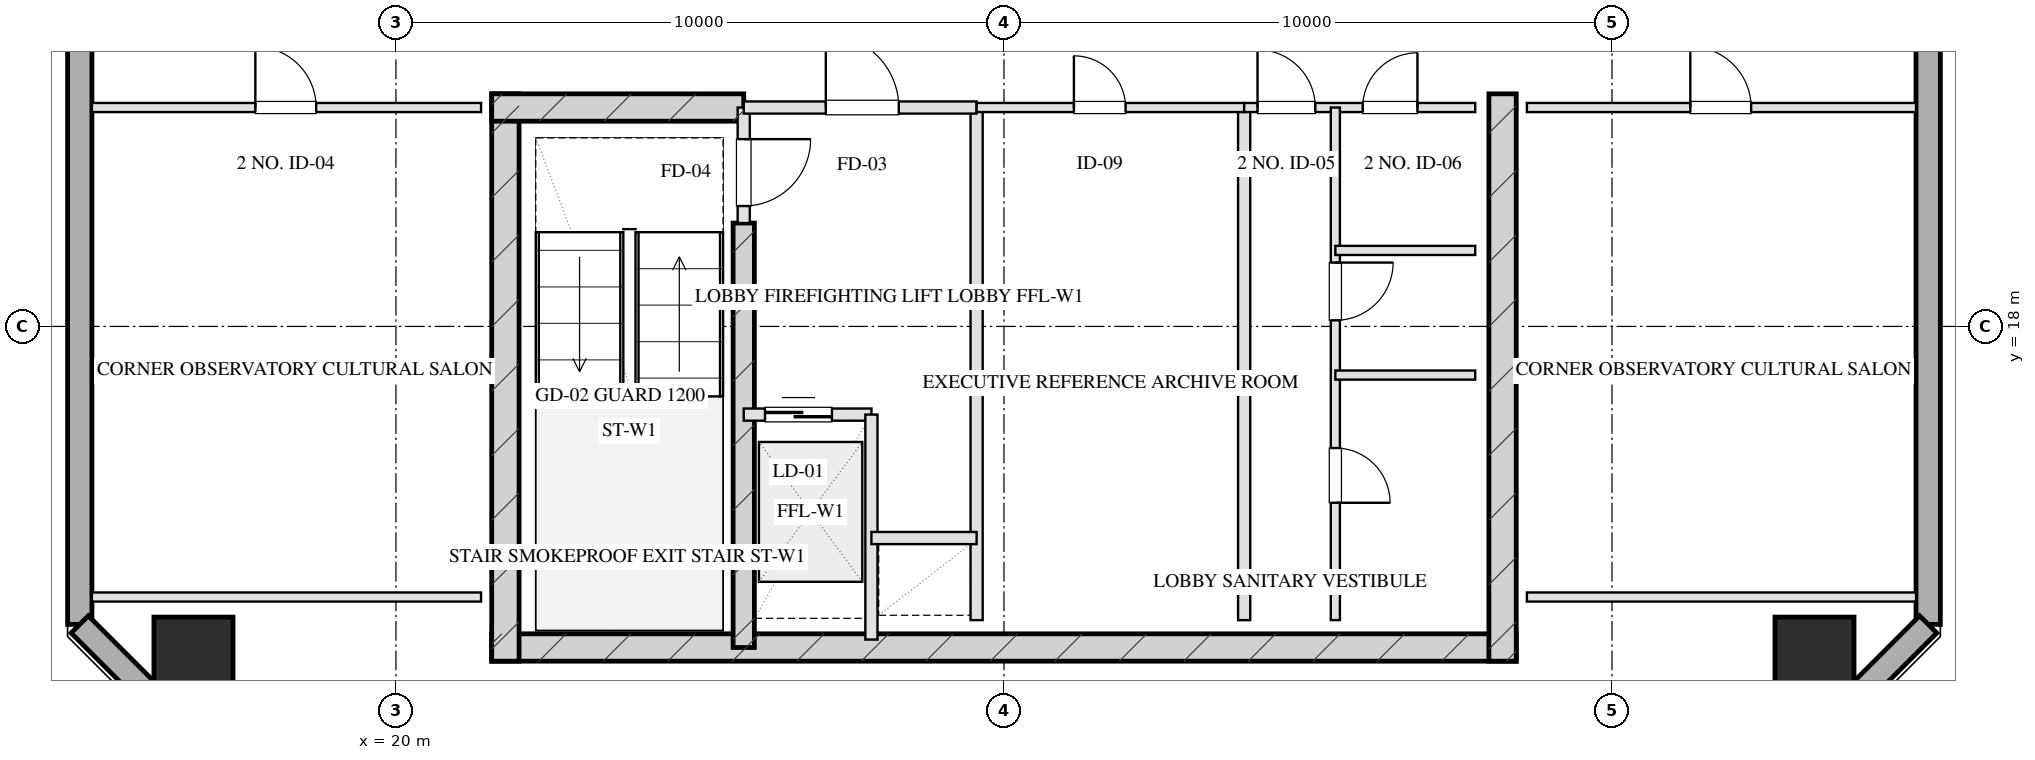
"""IFC4 building model, lengths in metres.
Left out: names, types, materials, properties, quantities, classifications, styles, units other than length and angle.
Written with IfcOpenShell. Run it as: python <this file> out.ifc"""

import sys

from ifc_helpers import new_model, si_unit, direction, frame, frame_2d, origin, origin_2d, place, context, subcontext, project, spatial, rectangle, hollow_rectangle, extrude, element, fill, save


model = new_model("IFC4")
c1 = context("Model", 3, precision=1e-05, world=origin(), true_north=direction((0.0, 1.0)))
c2 = subcontext(c1, "Body", "Model", "MODEL_VIEW")
j1 = project(units=[si_unit("LENGTHUNIT", "METRE"), si_unit("PLANEANGLEUNIT", "RADIAN")], contexts=[c1])
p1 = place(None, origin())
s1 = spatial("IfcSite", under=j1, at=p1, CompositionType="ELEMENT")
p2 = place(p1, origin())
s2 = spatial("IfcBuilding", under=s1, at=p2, CompositionType="ELEMENT")
p3 = place(p2, frame((0.0, 0.0, 266.4)))
s3 = spatial("IfcBuildingStorey", under=s2, at=p3, CompositionType="ELEMENT", Elevation=266.4)
p4 = place(p3, frame((21.575, 12.72, 0.0), z_axis=(0.0, 0.0, 1.0), x_axis=(1.0, 0.0, 0.0)))
e1 = element("IfcWall", 1, at=p4, inside=s3, PredefinedType="SHEAR", context=c2, shape_type="SweptSolid", body=[
    extrude(rectangle(XDim=16.85, YDim=0.45, at=frame_2d((8.425, 0.0))), origin(), (0.0, 0.0, 1.0), 3.2),
])
for number, where, z_axis, x_axis in (
    (2, (21.8, 21.825, 0.0), (0.0, 0.0, 1.0), (0.0, -1.0, 0.0)),
    (3, (38.2, 21.825, 0.0), (0.0, 0.0, 1.0), (0.0, -1.0, 0.0)),
):
    element("IfcWall", number, at=place(p3, frame(where, z_axis=z_axis, x_axis=x_axis)), inside=s3, PredefinedType="SHEAR", context=c2, shape_type="SweptSolid", body=[
        extrude(rectangle(XDim=9.33, YDim=0.45, at=frame_2d((4.665, 0.0))), origin(), (0.0, 0.0, 1.0), 3.2),
    ])
p5 = place(p3, frame((25.72, 19.7, 0.0), z_axis=(0.0, 0.0, 1.0), x_axis=(0.0, -1.0, 0.0)))
e4 = element("IfcWall", 4, at=p5, inside=s3, PredefinedType="SHEAR", context=c2, shape_type="SweptSolid", body=[
    extrude(rectangle(XDim=6.98, YDim=0.35, at=frame_2d((3.49, 0.0))), origin(), (0.0, 0.0, 1.0), 3.2),
])
p6 = place(p3, frame((21.575, 21.6, 0.0), z_axis=(0.0, 0.0, 1.0), x_axis=(1.0, 0.0, 0.0)))
e5 = element("IfcWall", 5, at=p6, inside=s3, PredefinedType="SHEAR", context=c2, shape_type="SweptSolid", body=[
    extrude(rectangle(XDim=4.145, YDim=0.45, at=frame_2d((2.073, 0.0))), origin(), (0.0, 0.0, 1.0), 3.2),
])
for number, where, z_axis, x_axis in (
    (6, (16.67, 12.57, 0.0), (0.0, 0.0, 1.0), (1.0, 0.0, 0.0)),
    (7, (43.33, 12.57, 0.0), (0.0, 0.0, 1.0), (1.0, 0.0, 0.0)),
):
    element("IfcColumn", number, at=place(p3, frame(where, z_axis=z_axis, x_axis=x_axis)), inside=s3, PredefinedType="COLUMN", context=c2, shape_type="SweptSolid", body=[
        extrude(hollow_rectangle(XDim=1.3, YDim=1.3, WallThickness=0.045, at=origin_2d()), origin(), (0.0, 0.0, 1.0), 3.201),
    ])
p7 = place(p3, frame((14.8, 13.1, 0.0), z_axis=(0.0, 0.0, 1.0), x_axis=(0.0, 1.0, 0.0)))
e8 = element("IfcWall", 8, at=p7, inside=s3, PredefinedType="SOLIDWALL", context=c2, shape_type="SweptSolid", body=[
    extrude(rectangle(XDim=41.8, YDim=0.4, at=frame_2d((20.9, 0.0))), origin(), (0.0, 0.0, 1.0), 2.36),
])
p8 = place(p7, frame((13.525, 0.0, 0.75)))
e9 = element("IfcOpeningElement", 9, at=p8, cuts=e8, PredefinedType="OPENING", context=c2, shape_type="SweptSolid", body=[
    extrude(rectangle(XDim=1.95, YDim=1.21, at=frame_2d((0.975, 0.605))), frame((0.0, 0.21, 0.0), z_axis=(0.0, -1.0, 0.0), x_axis=(1.0, 0.0, 0.0)), (0.0, 0.0, 1.0), 0.42),
])
p9 = place(p7, frame((17.325, 0.0, 0.75)))
e10 = element("IfcOpeningElement", 10, at=p9, cuts=e8, PredefinedType="OPENING", context=c2, shape_type="SweptSolid", body=[
    extrude(rectangle(XDim=1.95, YDim=1.21, at=frame_2d((0.975, 0.605))), frame((0.0, 0.21, 0.0), z_axis=(0.0, -1.0, 0.0), x_axis=(1.0, 0.0, 0.0)), (0.0, 0.0, 1.0), 0.42),
])
p10 = place(p7, frame((26.15, 0.0, 0.0)))
e11 = element("IfcOpeningElement", 11, at=p10, cuts=e8, PredefinedType="OPENING", context=c2, shape_type="SweptSolid", body=[
    extrude(rectangle(XDim=1.1, YDim=2.15, at=frame_2d((0.55, 1.075))), frame((0.0, 0.21, 0.0), z_axis=(0.0, -1.0, 0.0), x_axis=(1.0, 0.0, 0.0)), (0.0, 0.0, 1.0), 0.42),
])
p11 = place(p3, frame((45.2, 54.9, 0.0), z_axis=(0.0, 0.0, 1.0), x_axis=(0.0, -1.0, 0.0)))
e12 = element("IfcWall", 12, at=p11, inside=s3, PredefinedType="SOLIDWALL", context=c2, shape_type="SweptSolid", body=[
    extrude(rectangle(XDim=41.8, YDim=0.4, at=frame_2d((20.9, 0.0))), origin(), (0.0, 0.0, 1.0), 2.36),
])
p12 = place(p11, frame((26.325, 0.0, 0.75)))
e13 = element("IfcOpeningElement", 13, at=p12, cuts=e12, PredefinedType="OPENING", context=c2, shape_type="SweptSolid", body=[
    extrude(rectangle(XDim=1.95, YDim=1.21, at=frame_2d((0.975, 0.605))), frame((0.0, 0.21, 0.0), z_axis=(0.0, -1.0, 0.0), x_axis=(1.0, 0.0, 0.0)), (0.0, 0.0, 1.0), 0.42),
])
p13 = place(p11, frame((22.525, 0.0, 0.75)))
e14 = element("IfcOpeningElement", 14, at=p13, cuts=e12, PredefinedType="OPENING", context=c2, shape_type="SweptSolid", body=[
    extrude(rectangle(XDim=1.95, YDim=1.21, at=frame_2d((0.975, 0.605))), frame((0.0, 0.21, 0.0), z_axis=(0.0, -1.0, 0.0), x_axis=(1.0, 0.0, 0.0)), (0.0, 0.0, 1.0), 0.42),
])
p14 = place(p11, frame((14.55, 0.0, 0.0)))
e15 = element("IfcOpeningElement", 15, at=p14, cuts=e12, PredefinedType="OPENING", context=c2, shape_type="SweptSolid", body=[
    extrude(rectangle(XDim=1.1, YDim=2.15, at=frame_2d((0.55, 1.075))), frame((0.0, 0.21, 0.0), z_axis=(0.0, -1.0, 0.0), x_axis=(1.0, 0.0, 0.0)), (0.0, 0.0, 1.0), 0.42),
])
for number, where, z_axis, x_axis in (
    (16, (45.2, 13.1, 0.0), (0.0, 0.0, 1.0), (-0.707, -0.707, 0.0)),
    (17, (17.2, 10.7, 0.0), (0.0, 0.0, 1.0), (-0.707, 0.707, 0.0)),
):
    element("IfcWall", number, at=place(p3, frame(where, z_axis=z_axis, x_axis=x_axis)), inside=s3, PredefinedType="SOLIDWALL", context=c2, shape_type="SweptSolid", body=[
        extrude(rectangle(XDim=3.394, YDim=0.4, at=frame_2d((1.697, 0.0))), origin(), (0.0, 0.0, 1.0), 2.36),
    ])
p15 = place(p3, frame((25.72, 21.6, 0.0), z_axis=(0.0, 0.0, 1.0), x_axis=(0.0, -1.0, 0.0)))
e18 = element("IfcWall", 18, at=p15, inside=s3, PredefinedType="PARTITIONING", context=c2, shape_type="SweptSolid", body=[
    extrude(rectangle(XDim=1.9, YDim=0.2, at=frame_2d((0.95, 0.0))), origin(), (0.0, 0.0, 1.0), 2.925),
])
p16 = place(p15, frame((0.52, 0.0, 0.0)))
e19 = element("IfcOpeningElement", 19, at=p16, cuts=e18, PredefinedType="OPENING", context=c2, shape_type="SweptSolid", body=[
    extrude(rectangle(XDim=1.1, YDim=2.05, at=frame_2d((0.55, 1.025))), frame((0.0, 0.11, 0.0), z_axis=(0.0, -1.0, 0.0), x_axis=(1.0, 0.0, 0.0)), (0.0, 0.0, 1.0), 0.22),
])
p17 = place(p3, frame((29.55, 21.6, 0.0), z_axis=(0.0, 0.0, 1.0), x_axis=(0.0, -1.0, 0.0)))
e20 = element("IfcWall", 20, at=p17, inside=s3, PredefinedType="PARTITIONING", context=c2, shape_type="SweptSolid", body=[
    extrude(rectangle(XDim=8.43, YDim=0.2, at=frame_2d((4.215, 0.0))), origin(), (0.0, 0.0, 1.0), 2.925),
])
p18 = place(p3, frame((25.72, 21.6, 0.0), z_axis=(0.0, 0.0, 1.0), x_axis=(1.0, 0.0, 0.0)))
e21 = element("IfcWall", 21, at=p18, inside=s3, PredefinedType="PARTITIONING", context=c2, shape_type="SweptSolid", body=[
    extrude(rectangle(XDim=3.83, YDim=0.2, at=frame_2d((1.915, 0.0))), origin(), (0.0, 0.0, 1.0), 2.925),
])
p19 = place(p18, frame((1.35, 0.0, 0.0)))
e22 = element("IfcOpeningElement", 22, at=p19, cuts=e21, PredefinedType="OPENING", context=c2, shape_type="SweptSolid", body=[
    extrude(rectangle(XDim=1.2, YDim=2.05, at=frame_2d((0.6, 1.025))), frame((0.0, 0.11, 0.0), z_axis=(0.0, -1.0, 0.0), x_axis=(1.0, 0.0, 0.0)), (0.0, 0.0, 1.0), 0.22),
])
p20 = place(p3, frame((25.72, 16.55, 0.0), z_axis=(0.0, 0.0, 1.0), x_axis=(1.0, 0.0, 0.0)))
e23 = element("IfcWall", 23, at=p20, inside=s3, PredefinedType="PARTITIONING", context=c2, shape_type="SweptSolid", body=[
    extrude(rectangle(XDim=2.1, YDim=0.2, at=frame_2d((1.05, 0.0))), origin(), (0.0, 0.0, 1.0), 2.925),
])
p21 = place(p20, frame((0.35, 0.0, 0.0)))
e24 = element("IfcOpeningElement", 24, at=p21, cuts=e23, PredefinedType="OPENING", context=c2, shape_type="SweptSolid", body=[
    extrude(rectangle(XDim=1.1, YDim=2.05, at=frame_2d((0.55, 1.025))), frame((0.0, 0.11, 0.0), z_axis=(0.0, -1.0, 0.0), x_axis=(1.0, 0.0, 0.0)), (0.0, 0.0, 1.0), 0.22),
])
p22 = place(p3, frame((27.82, 16.55, 0.0), z_axis=(0.0, 0.0, 1.0), x_axis=(0.0, -1.0, 0.0)))
e25 = element("IfcWall", 25, at=p22, inside=s3, PredefinedType="PARTITIONING", context=c2, shape_type="SweptSolid", body=[
    extrude(rectangle(XDim=3.7, YDim=0.2, at=frame_2d((1.85, 0.0))), origin(), (0.0, 0.0, 1.0), 2.925),
])
p23 = place(p3, frame((27.82, 14.52, 0.0), z_axis=(0.0, 0.0, 1.0), x_axis=(1.0, 0.0, 0.0)))
e26 = element("IfcWall", 26, at=p23, inside=s3, PredefinedType="PARTITIONING", context=c2, shape_type="SweptSolid", body=[
    extrude(rectangle(XDim=1.73, YDim=0.2, at=frame_2d((0.865, 0.0))), origin(), (0.0, 0.0, 1.0), 2.925),
])
p24 = place(p3, frame((33.95, 21.6, 0.0), z_axis=(0.0, 0.0, 1.0), x_axis=(0.0, -1.0, 0.0)))
e27 = element("IfcWall", 27, at=p24, inside=s3, PredefinedType="PARTITIONING", context=c2, shape_type="SweptSolid", body=[
    extrude(rectangle(XDim=8.43, YDim=0.2, at=frame_2d((4.215, 0.0))), origin(), (0.0, 0.0, 1.0), 2.925),
])
p25 = place(p3, frame((29.55, 21.6, 0.0), z_axis=(0.0, 0.0, 1.0), x_axis=(1.0, 0.0, 0.0)))
e28 = element("IfcWall", 28, at=p25, inside=s3, PredefinedType="PARTITIONING", context=c2, shape_type="SweptSolid", body=[
    extrude(rectangle(XDim=4.4, YDim=0.15, at=frame_2d((2.2, 0.0))), origin(), (0.0, 0.0, 1.0), 2.925),
])
p26 = place(p25, frame((1.6, 0.0, 0.0)))
e29 = element("IfcOpeningElement", 29, at=p26, cuts=e28, PredefinedType="OPENING", context=c2, shape_type="SweptSolid", body=[
    extrude(rectangle(XDim=0.85, YDim=2.05, at=frame_2d((0.425, 1.025))), frame((0.0, 0.085, 0.0), z_axis=(0.0, -1.0, 0.0), x_axis=(1.0, 0.0, 0.0)), (0.0, 0.0, 1.0), 0.17),
])
p27 = place(p3, frame((33.95, 21.6, 0.0), z_axis=(0.0, 0.0, 1.0), x_axis=(1.0, 0.0, 0.0)))
e30 = element("IfcWall", 30, at=p27, inside=s3, PredefinedType="PARTITIONING", context=c2, shape_type="SweptSolid", body=[
    extrude(rectangle(XDim=3.8, YDim=0.15, at=frame_2d((1.9, 0.0))), origin(), (0.0, 0.0, 1.0), 2.925),
])
p28 = place(p27, frame((0.22, 0.0, 0.0)))
e31 = element("IfcOpeningElement", 31, at=p28, cuts=e30, PredefinedType="OPENING", context=c2, shape_type="SweptSolid", body=[
    extrude(rectangle(XDim=0.95, YDim=2.05, at=frame_2d((0.475, 1.025))), frame((0.0, 0.085, 0.0), z_axis=(0.0, -1.0, 0.0), x_axis=(1.0, 0.0, 0.0)), (0.0, 0.0, 1.0), 0.17),
])
p29 = place(p27, frame((1.95, 0.0, 0.0)))
e32 = element("IfcOpeningElement", 32, at=p29, cuts=e30, PredefinedType="OPENING", context=c2, shape_type="SweptSolid", body=[
    extrude(rectangle(XDim=0.9, YDim=2.05, at=frame_2d((0.45, 1.025))), frame((0.0, 0.085, 0.0), z_axis=(0.0, -1.0, 0.0), x_axis=(1.0, 0.0, 0.0)), (0.0, 0.0, 1.0), 0.17),
])
p30 = place(p3, frame((35.45, 21.6, 0.0), z_axis=(0.0, 0.0, 1.0), x_axis=(0.0, -1.0, 0.0)))
e33 = element("IfcWall", 33, at=p30, inside=s3, PredefinedType="PARTITIONING", context=c2, shape_type="SweptSolid", body=[
    extrude(rectangle(XDim=8.43, YDim=0.15, at=frame_2d((4.215, 0.0))), origin(), (0.0, 0.0, 1.0), 2.565),
])
p31 = place(p30, frame((2.55, 0.0, 0.0)))
e34 = element("IfcOpeningElement", 34, at=p31, cuts=e33, PredefinedType="OPENING", context=c2, shape_type="SweptSolid", body=[
    extrude(rectangle(XDim=0.95, YDim=2.05, at=frame_2d((0.475, 1.025))), frame((0.0, 0.085, 0.0), z_axis=(0.0, -1.0, 0.0), x_axis=(1.0, 0.0, 0.0)), (0.0, 0.0, 1.0), 0.17),
])
p32 = place(p30, frame((5.6, 0.0, 0.0)))
e35 = element("IfcOpeningElement", 35, at=p32, cuts=e33, PredefinedType="OPENING", context=c2, shape_type="SweptSolid", body=[
    extrude(rectangle(XDim=0.9, YDim=2.05, at=frame_2d((0.45, 1.025))), frame((0.0, 0.085, 0.0), z_axis=(0.0, -1.0, 0.0), x_axis=(1.0, 0.0, 0.0)), (0.0, 0.0, 1.0), 0.17),
])
for number, where, z_axis, x_axis in (
    (36, (35.45, 17.2, 0.0), (0.0, 0.0, 1.0), (1.0, 0.0, 0.0)),
    (37, (35.45, 19.25, 0.0), (0.0, 0.0, 1.0), (1.0, 0.0, 0.0)),
):
    element("IfcWall", number, at=place(p3, frame(where, z_axis=z_axis, x_axis=x_axis)), inside=s3, PredefinedType="PARTITIONING", context=c2, shape_type="SweptSolid", body=[
        extrude(rectangle(XDim=2.3, YDim=0.15, at=frame_2d((1.15, 0.0))), origin(), (0.0, 0.0, 1.0), 2.925),
    ])
p33 = place(p3, frame((15.0, 13.55, 0.0), z_axis=(0.0, 0.0, 1.0), x_axis=(1.0, 0.0, 0.0)))
e38 = element("IfcWall", 38, at=p33, inside=s3, PredefinedType="PARTITIONING", context=c2, shape_type="SweptSolid", body=[
    extrude(rectangle(XDim=6.4, YDim=0.15, at=frame_2d((3.2, 0.0))), origin(), (0.0, 0.0, 1.0), 2.925),
])
p34 = place(p3, frame((15.0, 21.6, 0.0), z_axis=(0.0, 0.0, 1.0), x_axis=(1.0, 0.0, 0.0)))
e39 = element("IfcWall", 39, at=p34, inside=s3, PredefinedType="PARTITIONING", context=c2, shape_type="SweptSolid", body=[
    extrude(rectangle(XDim=6.4, YDim=0.15, at=frame_2d((3.2, 0.0))), origin(), (0.0, 0.0, 1.0), 2.925),
])
p35 = place(p34, frame((2.688, 0.0, 0.0)))
e40 = element("IfcOpeningElement", 40, at=p35, cuts=e39, PredefinedType="OPENING", context=c2, shape_type="SweptSolid", body=[
    extrude(rectangle(XDim=1.0, YDim=2.05, at=frame_2d((0.5, 1.025))), frame((0.0, 0.085, 0.0), z_axis=(0.0, -1.0, 0.0), x_axis=(1.0, 0.0, 0.0)), (0.0, 0.0, 1.0), 0.17),
])
p36 = place(p3, frame((38.6, 13.55, 0.0), z_axis=(0.0, 0.0, 1.0), x_axis=(1.0, 0.0, 0.0)))
e41 = element("IfcWall", 41, at=p36, inside=s3, PredefinedType="PARTITIONING", context=c2, shape_type="SweptSolid", body=[
    extrude(rectangle(XDim=6.4, YDim=0.15, at=frame_2d((3.2, 0.0))), origin(), (0.0, 0.0, 1.0), 2.925),
])
p37 = place(p3, frame((38.6, 21.6, 0.0), z_axis=(0.0, 0.0, 1.0), x_axis=(1.0, 0.0, 0.0)))
e42 = element("IfcWall", 42, at=p37, inside=s3, PredefinedType="PARTITIONING", context=c2, shape_type="SweptSolid", body=[
    extrude(rectangle(XDim=6.4, YDim=0.15, at=frame_2d((3.2, 0.0))), origin(), (0.0, 0.0, 1.0), 2.925),
])
p38 = place(p37, frame((2.688, 0.0, 0.0)))
e43 = element("IfcOpeningElement", 43, at=p38, cuts=e42, PredefinedType="OPENING", context=c2, shape_type="SweptSolid", body=[
    extrude(rectangle(XDim=1.0, YDim=2.05, at=frame_2d((0.5, 1.025))), frame((0.0, 0.085, 0.0), z_axis=(0.0, -1.0, 0.0), x_axis=(1.0, 0.0, 0.0)), (0.0, 0.0, 1.0), 0.17),
])
p39 = place(p16, origin())
e44 = element("IfcDoor", 44, at=p39, inside=s3, OperationType="SINGLE_SWING_LEFT", PredefinedType="DOOR", context=c2, shape_type="SweptSolid", body=[
    extrude(rectangle(XDim=1.1, YDim=2.05, at=frame_2d((0.55, 1.025))), frame((0.0, 0.025, 0.0), z_axis=(0.0, -1.0, 0.0), x_axis=(1.0, 0.0, 0.0)), (0.0, 0.0, 1.0), 0.05),
])
fill(e19, e44)
p40 = place(p19, origin())
e45 = element("IfcDoor", 45, at=p40, inside=s3, OperationType="SINGLE_SWING_LEFT", PredefinedType="DOOR", context=c2, shape_type="SweptSolid", body=[
    extrude(rectangle(XDim=1.2, YDim=2.05, at=frame_2d((0.6, 1.025))), frame((0.0, 0.025, 0.0), z_axis=(0.0, -1.0, 0.0), x_axis=(1.0, 0.0, 0.0)), (0.0, 0.0, 1.0), 0.05),
])
fill(e22, e45)
p41 = place(p21, origin())
e46 = element("IfcDoor", 46, at=p41, inside=s3, OperationType="DOUBLE_DOOR_SLIDING", PredefinedType="DOOR", context=c2, shape_type="SweptSolid", body=[
    extrude(rectangle(XDim=1.1, YDim=2.05, at=frame_2d((0.55, 1.025))), frame((0.0, 0.025, 0.0), z_axis=(0.0, -1.0, 0.0), x_axis=(1.0, 0.0, 0.0)), (0.0, 0.0, 1.0), 0.05),
])
fill(e24, e46)
p42 = place(p26, origin())
e47 = element("IfcDoor", 47, at=p42, inside=s3, OperationType="SINGLE_SWING_LEFT", PredefinedType="DOOR", context=c2, shape_type="SweptSolid", body=[
    extrude(rectangle(XDim=0.85, YDim=2.05, at=frame_2d((0.425, 1.025))), frame((0.0, 0.025, 0.0), z_axis=(0.0, -1.0, 0.0), x_axis=(1.0, 0.0, 0.0)), (0.0, 0.0, 1.0), 0.05),
])
fill(e29, e47)
p43 = place(p28, origin())
e48 = element("IfcDoor", 48, at=p43, inside=s3, OperationType="SINGLE_SWING_LEFT", PredefinedType="DOOR", context=c2, shape_type="SweptSolid", body=[
    extrude(rectangle(XDim=0.95, YDim=2.05, at=frame_2d((0.475, 1.025))), frame((0.0, 0.025, 0.0), z_axis=(0.0, -1.0, 0.0), x_axis=(1.0, 0.0, 0.0)), (0.0, 0.0, 1.0), 0.05),
])
fill(e31, e48)
p44 = place(p29, origin())
e49 = element("IfcDoor", 49, at=p44, inside=s3, OperationType="SINGLE_SWING_RIGHT", PredefinedType="DOOR", context=c2, shape_type="SweptSolid", body=[
    extrude(rectangle(XDim=0.9, YDim=2.05, at=frame_2d((0.45, 1.025))), frame((0.0, 0.025, 0.0), z_axis=(0.0, -1.0, 0.0), x_axis=(1.0, 0.0, 0.0)), (0.0, 0.0, 1.0), 0.05),
])
fill(e32, e49)
p45 = place(p31, origin())
e50 = element("IfcDoor", 50, at=p45, inside=s3, OperationType="SINGLE_SWING_LEFT", PredefinedType="DOOR", context=c2, shape_type="SweptSolid", body=[
    extrude(rectangle(XDim=0.95, YDim=2.05, at=frame_2d((0.475, 1.025))), frame((0.0, 0.025, 0.0), z_axis=(0.0, -1.0, 0.0), x_axis=(1.0, 0.0, 0.0)), (0.0, 0.0, 1.0), 0.05),
])
fill(e34, e50)
p46 = place(p32, origin())
e51 = element("IfcDoor", 51, at=p46, inside=s3, OperationType="SINGLE_SWING_RIGHT", PredefinedType="DOOR", context=c2, shape_type="SweptSolid", body=[
    extrude(rectangle(XDim=0.9, YDim=2.05, at=frame_2d((0.45, 1.025))), frame((0.0, 0.025, 0.0), z_axis=(0.0, -1.0, 0.0), x_axis=(1.0, 0.0, 0.0)), (0.0, 0.0, 1.0), 0.05),
])
fill(e35, e51)
p47 = place(p35, origin())
e52 = element("IfcDoor", 52, at=p47, inside=s3, OperationType="SINGLE_SWING_LEFT", PredefinedType="DOOR", context=c2, shape_type="SweptSolid", body=[
    extrude(rectangle(XDim=1.0, YDim=2.05, at=frame_2d((0.5, 1.025))), frame((0.0, 0.025, 0.0), z_axis=(0.0, -1.0, 0.0), x_axis=(1.0, 0.0, 0.0)), (0.0, 0.0, 1.0), 0.05),
])
fill(e40, e52)
p48 = place(p38, origin())
e53 = element("IfcDoor", 53, at=p48, inside=s3, OperationType="SINGLE_SWING_LEFT", PredefinedType="DOOR", context=c2, shape_type="SweptSolid", body=[
    extrude(rectangle(XDim=1.0, YDim=2.05, at=frame_2d((0.5, 1.025))), frame((0.0, 0.025, 0.0), z_axis=(0.0, -1.0, 0.0), x_axis=(1.0, 0.0, 0.0)), (0.0, 0.0, 1.0), 0.05),
])
fill(e43, e53)
save(model, sys.argv[1])
